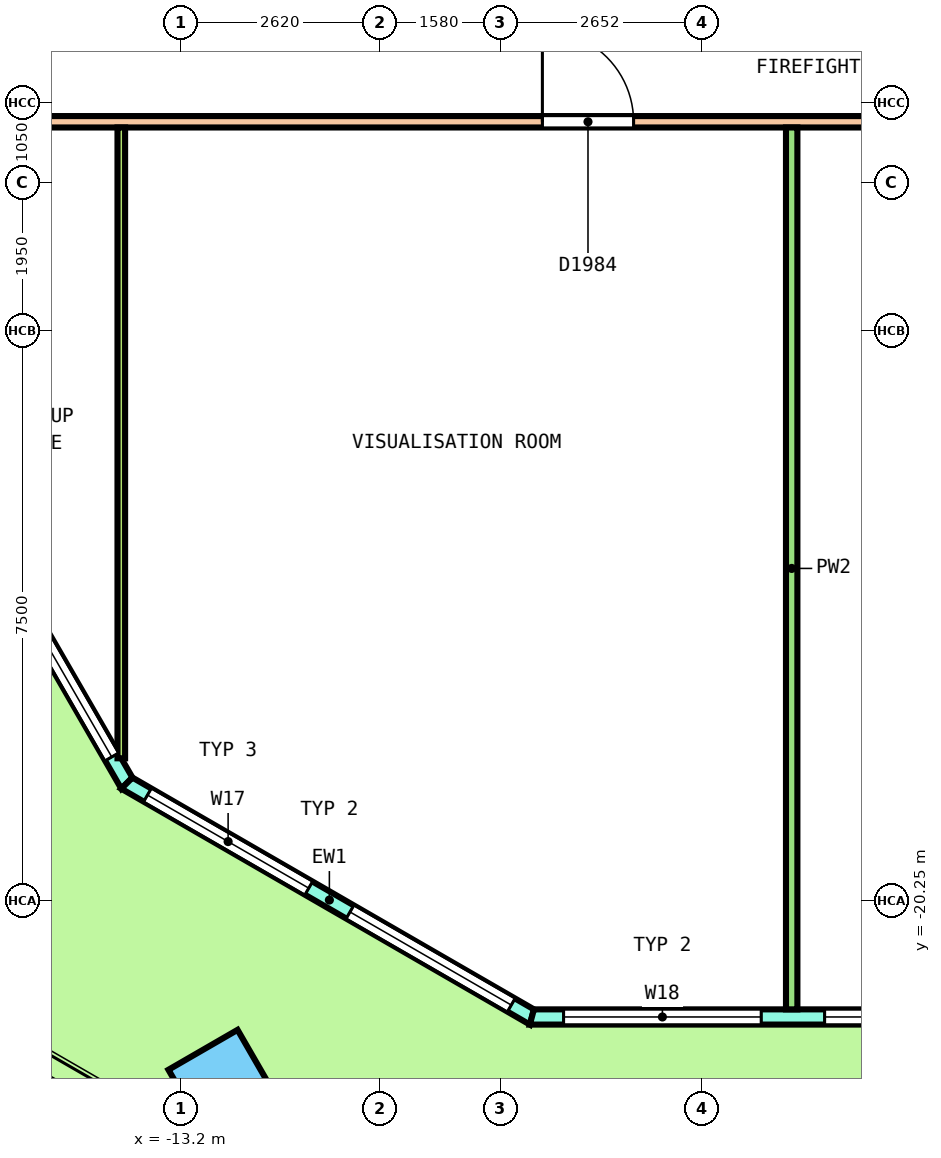
"""IFC4 building model, lengths in metres.
Left out: names, types, materials, properties, quantities, classifications, styles, units other than length and angle.
Written with IfcOpenShell. Run it as: python <this file> out.ifc"""

import sys

from ifc_helpers import new_model, si_unit, direction, frame, frame_2d, origin, origin_2d, place, context, subcontext, project, spatial, polyline, rectangle, outline, extrude, element, fill, save


model = new_model("IFC4")
c1 = context("Model", 3, precision=1e-05, world=origin(), true_north=direction((0.0, 1.0)))
c2 = subcontext(c1, "Body", "Model", "MODEL_VIEW")
j1 = project(units=[si_unit("LENGTHUNIT", "METRE"), si_unit("PLANEANGLEUNIT", "RADIAN")], contexts=[c1])
p1 = place(None, origin())
s1 = spatial("IfcSite", under=j1, at=p1, CompositionType="ELEMENT")
p2 = place(p1, origin())
s2 = spatial("IfcBuilding", under=s1, at=p2, CompositionType="ELEMENT")
p3 = place(p2, frame((0.0, 0.0, 223.4)))
s3 = spatial("IfcBuildingStorey", under=s2, at=p3, CompositionType="ELEMENT", Elevation=223.4)
p4 = place(p3, frame((-12.649, -22.664, 0.0), z_axis=(0.018113955825, -0.03141534774, 0.999342263957), x_axis=(0.86551973078, -0.499889444942, -0.031402841694)))
e1 = element("IfcColumn", 1, at=p4, inside=s3, PredefinedType="COLUMN", context=c2, shape_type="SweptSolid", body=[
    extrude(rectangle(XDim=1.05, YDim=1.05, at=origin_2d()), origin(), (0.0, 0.0, 1.0), 3.653),
])
p5 = place(p3, frame((-23.152, -2.699, 0.0), z_axis=(0.0, 0.0, 1.0), x_axis=(0.499993148765, -0.866029359311, 0.0)))
e2 = element("IfcWall", 2, at=p5, inside=s3, PredefinedType="SOLIDWALL", context=c2, shape_type="SweptSolid", body=[
    extrude(outline(polyline([(-0.027, -0.1), (1.003, -0.1), (2.032, -0.1), (3.062, -0.1), (4.091, -0.1), (5.121, -0.1), (6.15, -0.1), (7.179, -0.1), (8.209, -0.1), (9.238, -0.1), (10.268, -0.1), (11.297, -0.1), (12.327, -0.1), (13.356, -0.1), (14.386, -0.1), (15.415, -0.1), (16.445, -0.1), (17.474, -0.1), (18.504, -0.1), (18.45, 0.1), (17.427, 0.1), (16.403, 0.1), (15.379, 0.1), (14.356, 0.1), (13.333, 0.1), (12.309, 0.1), (11.285, 0.1), (10.262, 0.1), (9.238, 0.1), (8.215, 0.1), (7.191, 0.1), (6.168, 0.1), (5.144, 0.1), (4.121, 0.1), (3.097, 0.1), (2.074, 0.1), (1.05, 0.1), (0.027, 0.1), (-0.027, -0.1)])), origin(), (0.0, 0.0, 1.0), 3.7),
])
p6 = place(p5, frame((0.398, 0.0, 0.1)))
e3 = element("IfcOpeningElement", 3, at=p6, cuts=e2, PredefinedType="OPENING", context=c2, shape_type="SweptSolid", body=[
    extrude(rectangle(XDim=2.9, YDim=2.65, at=frame_2d((1.45, 1.325))), frame((0.0, 0.11, 0.0), z_axis=(0.0, -1.0, 0.0), x_axis=(1.0, 0.0, 0.0)), (0.0, 0.0, 1.0), 0.22),
])
p7 = place(p5, frame((4.093, 0.0, 0.1)))
e4 = element("IfcOpeningElement", 4, at=p7, cuts=e2, PredefinedType="OPENING", context=c2, shape_type="SweptSolid", body=[
    extrude(rectangle(XDim=2.9, YDim=2.65, at=frame_2d((1.45, 1.325))), frame((0.0, 0.11, 0.0), z_axis=(0.0, -1.0, 0.0), x_axis=(1.0, 0.0, 0.0)), (0.0, 0.0, 1.0), 0.22),
])
p8 = place(p5, frame((8.338, 0.0, 0.0)))
e5 = element("IfcOpeningElement", 5, at=p8, cuts=e2, PredefinedType="OPENING", context=c2, shape_type="SweptSolid", body=[
    extrude(rectangle(XDim=1.8, YDim=2.4, at=frame_2d((0.9, 1.2))), frame((0.0, 0.11, 0.0), z_axis=(0.0, -1.0, 0.0), x_axis=(1.0, 0.0, 0.0)), (0.0, 0.0, 1.0), 0.22),
])
p9 = place(p5, frame((8.338, 0.0, 2.55)))
e6 = element("IfcOpeningElement", 6, at=p9, cuts=e2, PredefinedType="OPENING", context=c2, shape_type="SweptSolid", body=[
    extrude(rectangle(XDim=1.8, YDim=0.2, at=frame_2d((0.9, 0.1))), frame((0.0, 0.11, 0.0), z_axis=(0.0, -1.0, 0.0), x_axis=(1.0, 0.0, 0.0)), (0.0, 0.0, 1.0), 0.22),
])
p10 = place(p5, frame((11.484, 0.0, 0.1)))
e7 = element("IfcOpeningElement", 7, at=p10, cuts=e2, PredefinedType="OPENING", context=c2, shape_type="SweptSolid", body=[
    extrude(rectangle(XDim=2.9, YDim=2.65, at=frame_2d((1.45, 1.325))), frame((0.0, 0.11, 0.0), z_axis=(0.0, -1.0, 0.0), x_axis=(1.0, 0.0, 0.0)), (0.0, 0.0, 1.0), 0.22),
])
p11 = place(p5, frame((15.179, 0.0, 0.1)))
e8 = element("IfcOpeningElement", 8, at=p11, cuts=e2, PredefinedType="OPENING", context=c2, shape_type="SweptSolid", body=[
    extrude(rectangle(XDim=2.9, YDim=2.65, at=frame_2d((1.45, 1.325))), frame((0.0, 0.11, 0.0), z_axis=(0.0, -1.0, 0.0), x_axis=(1.0, 0.0, 0.0)), (0.0, 0.0, 1.0), 0.22),
])
p12 = place(p3, frame((-13.914, -18.701, 0.0), z_axis=(0.0, 0.0, 1.0), x_axis=(0.866029647142, -0.499992650217, 0.0)))
e9 = element("IfcWall", 9, at=p12, inside=s3, PredefinedType="SOLIDWALL", context=c2, shape_type="SweptSolid", body=[
    extrude(outline(polyline([(-0.027, -0.1), (1.008, -0.1), (2.042, -0.1), (3.076, -0.1), (4.111, -0.1), (5.145, -0.1), (6.18, -0.1), (6.126, 0.1), (5.109, 0.1), (4.093, 0.1), (3.076, 0.1), (2.06, 0.1), (1.043, 0.1), (0.027, 0.1), (-0.027, -0.1)])), origin(), (0.0, 0.0, 1.0), 3.7),
])
p13 = place(p12, frame((0.313, 0.0, 0.1)))
e10 = element("IfcOpeningElement", 10, at=p13, cuts=e9, PredefinedType="OPENING", context=c2, shape_type="SweptSolid", body=[
    extrude(rectangle(XDim=2.45, YDim=2.65, at=frame_2d((1.225, 1.325))), frame((0.0, 0.11, 0.0), z_axis=(0.0, -1.0, 0.0), x_axis=(1.0, 0.0, 0.0)), (0.0, 0.0, 1.0), 0.22),
])
p14 = place(p12, frame((3.39, 0.0, 0.1)))
e11 = element("IfcOpeningElement", 11, at=p14, cuts=e9, PredefinedType="OPENING", context=c2, shape_type="SweptSolid", body=[
    extrude(rectangle(XDim=2.45, YDim=2.65, at=frame_2d((1.225, 1.325))), frame((0.0, 0.11, 0.0), z_axis=(0.0, -1.0, 0.0), x_axis=(1.0, 0.0, 0.0)), (0.0, 0.0, 1.0), 0.22),
])
p15 = place(p3, frame((-8.585, -21.777, 0.0), z_axis=(0.0, 0.0, 1.0), x_axis=(1.0, 0.0, 0.0)))
e12 = element("IfcWall", 12, at=p15, inside=s3, PredefinedType="SOLIDWALL", context=c2, shape_type="SweptSolid", body=[
    extrude(outline(polyline([(-0.027, -0.1), (0.986, -0.1), (2.0, -0.1), (3.013, -0.1), (4.026, -0.1), (5.039, -0.1), (6.052, -0.1), (7.065, -0.1), (8.079, -0.1), (9.092, -0.1), (10.105, -0.1), (11.118, -0.1), (12.131, -0.1), (13.145, -0.1), (14.158, -0.1), (15.171, -0.1), (16.184, -0.1), (17.197, -0.1), (17.144, 0.1), (16.137, 0.1), (15.13, 0.1), (14.123, 0.1), (13.116, 0.1), (12.109, 0.1), (11.102, 0.1), (10.095, 0.1), (9.089, 0.1), (8.082, 0.1), (7.075, 0.1), (6.068, 0.1), (5.061, 0.1), (4.054, 0.1), (3.047, 0.1), (2.041, 0.1), (1.034, 0.1), (0.027, 0.1), (-0.027, -0.1)])), origin(), (0.0, 0.0, 1.0), 3.7),
])
p16 = place(p15, frame((0.417, 0.0, 0.1)))
e13 = element("IfcOpeningElement", 13, at=p16, cuts=e12, PredefinedType="OPENING", context=c2, shape_type="SweptSolid", body=[
    extrude(rectangle(XDim=2.6, YDim=2.65, at=frame_2d((1.3, 1.325))), frame((0.0, 0.11, 0.0), z_axis=(0.0, -1.0, 0.0), x_axis=(1.0, 0.0, 0.0)), (0.0, 0.0, 1.0), 0.22),
])
p17 = place(p15, frame((3.851, 0.0, 0.1)))
e14 = element("IfcOpeningElement", 14, at=p17, cuts=e12, PredefinedType="OPENING", context=c2, shape_type="SweptSolid", body=[
    extrude(rectangle(XDim=2.6, YDim=2.65, at=frame_2d((1.3, 1.325))), frame((0.0, 0.11, 0.0), z_axis=(0.0, -1.0, 0.0), x_axis=(1.0, 0.0, 0.0)), (0.0, 0.0, 1.0), 0.22),
])
p18 = place(p15, frame((7.685, 0.0, 0.0)))
e15 = element("IfcOpeningElement", 15, at=p18, cuts=e12, PredefinedType="OPENING", context=c2, shape_type="SweptSolid", body=[
    extrude(rectangle(XDim=1.8, YDim=2.4, at=frame_2d((0.9, 1.2))), frame((0.0, 0.11, 0.0), z_axis=(0.0, -1.0, 0.0), x_axis=(1.0, 0.0, 0.0)), (0.0, 0.0, 1.0), 0.22),
])
p19 = place(p15, frame((7.685, 0.0, 2.55)))
e16 = element("IfcOpeningElement", 16, at=p19, cuts=e12, PredefinedType="OPENING", context=c2, shape_type="SweptSolid", body=[
    extrude(rectangle(XDim=1.8, YDim=0.2, at=frame_2d((0.9, 0.1))), frame((0.0, 0.11, 0.0), z_axis=(0.0, -1.0, 0.0), x_axis=(1.0, 0.0, 0.0)), (0.0, 0.0, 1.0), 0.22),
])
p20 = place(p15, frame((10.719, 0.0, 0.1)))
e17 = element("IfcOpeningElement", 17, at=p20, cuts=e12, PredefinedType="OPENING", context=c2, shape_type="SweptSolid", body=[
    extrude(rectangle(XDim=2.6, YDim=2.65, at=frame_2d((1.3, 1.325))), frame((0.0, 0.11, 0.0), z_axis=(0.0, -1.0, 0.0), x_axis=(1.0, 0.0, 0.0)), (0.0, 0.0, 1.0), 0.22),
])
p21 = place(p15, frame((14.153, 0.0, 0.1)))
e18 = element("IfcOpeningElement", 18, at=p21, cuts=e12, PredefinedType="OPENING", context=c2, shape_type="SweptSolid", body=[
    extrude(rectangle(XDim=2.6, YDim=2.65, at=frame_2d((1.3, 1.325))), frame((0.0, 0.11, 0.0), z_axis=(0.0, -1.0, 0.0), x_axis=(1.0, 0.0, 0.0)), (0.0, 0.0, 1.0), 0.22),
])
p22 = place(p3, frame((-15.175, -10.0, 0.0), z_axis=(0.0, 0.0, 1.0), x_axis=(1.0, 0.0, 0.0)))
e19 = element("IfcWall", 19, at=p22, inside=s3, PredefinedType="PARTITIONING", context=c2, shape_type="SweptSolid", body=[
    extrude(rectangle(XDim=30.225, YDim=0.15, at=frame_2d((15.113, 0.0))), origin(), (0.0, 0.0, 1.0), 2.8),
])
p23 = place(p22, frame((6.728, 0.0, 0.0)))
e20 = element("IfcOpeningElement", 20, at=p23, cuts=e19, PredefinedType="OPENING", context=c2, shape_type="SweptSolid", body=[
    extrude(rectangle(XDim=1.2, YDim=2.1, at=frame_2d((0.6, 1.05))), frame((0.0, 0.085, 0.0), z_axis=(0.0, -1.0, 0.0), x_axis=(1.0, 0.0, 0.0)), (0.0, 0.0, 1.0), 0.17),
])
p24 = place(p22, frame((14.1, 0.0, 0.0)))
e21 = element("IfcOpeningElement", 21, at=p24, cuts=e19, PredefinedType="OPENING", context=c2, shape_type="SweptSolid", body=[
    extrude(rectangle(XDim=1.2, YDim=2.1, at=frame_2d((0.6, 1.05))), frame((0.0, 0.085, 0.0), z_axis=(0.0, -1.0, 0.0), x_axis=(1.0, 0.0, 0.0)), (0.0, 0.0, 1.0), 0.17),
])
p25 = place(p22, frame((19.842, 0.0, 0.0)))
e22 = element("IfcOpeningElement", 22, at=p25, cuts=e19, PredefinedType="OPENING", context=c2, shape_type="SweptSolid", body=[
    extrude(rectangle(XDim=1.0, YDim=2.1, at=frame_2d((0.5, 1.05))), frame((0.0, 0.085, 0.0), z_axis=(0.0, -1.0, 0.0), x_axis=(1.0, 0.0, 0.0)), (0.0, 0.0, 1.0), 0.17),
])
p26 = place(p22, frame((26.396, 0.0, 0.0)))
e23 = element("IfcOpeningElement", 23, at=p26, cuts=e19, PredefinedType="OPENING", context=c2, shape_type="SweptSolid", body=[
    extrude(rectangle(XDim=1.2, YDim=2.1, at=frame_2d((0.6, 1.05))), frame((0.0, 0.085, 0.0), z_axis=(0.0, -1.0, 0.0), x_axis=(1.0, 0.0, 0.0)), (0.0, 0.0, 1.0), 0.17),
])
p27 = place(p3, frame((-5.167, -21.677, 0.0), z_axis=(0.0, 0.0, 1.0), x_axis=(0.0, 1.0, 0.0)))
e24 = element("IfcWall", 24, at=p27, inside=s3, PredefinedType="PARTITIONING", context=c2, shape_type="SweptSolid", body=[
    extrude(rectangle(XDim=11.602, YDim=0.15, at=frame_2d((5.801, 0.0))), origin(), (0.0, 0.0, 1.0), 2.8),
])
p28 = place(p3, frame((-13.987, -18.374, 0.0), z_axis=(0.0, 0.0, 1.0), x_axis=(0.0, 1.0, 0.0)))
e25 = element("IfcWall", 25, at=p28, inside=s3, PredefinedType="PARTITIONING", context=c2, shape_type="SweptSolid", body=[
    extrude(rectangle(XDim=8.299, YDim=0.1, at=frame_2d((4.149, 0.0))), origin(), (0.0, 0.0, 1.0), 2.8),
])
p29 = place(p11, origin())
e26 = element("IfcWindow", 26, at=p29, inside=s3, PartitioningType="SINGLE_PANEL", PredefinedType="WINDOW", context=c2, shape_type="SweptSolid", body=[
    extrude(rectangle(XDim=2.9, YDim=2.65, at=frame_2d((1.45, 1.325))), frame((0.0, 0.03, 0.0), z_axis=(0.0, -1.0, 0.0), x_axis=(1.0, 0.0, 0.0)), (0.0, 0.0, 1.0), 0.06),
])
fill(e8, e26)
p30 = place(p13, origin())
e27 = element("IfcWindow", 27, at=p30, inside=s3, PartitioningType="SINGLE_PANEL", PredefinedType="WINDOW", context=c2, shape_type="SweptSolid", body=[
    extrude(rectangle(XDim=2.45, YDim=2.65, at=frame_2d((1.225, 1.325))), frame((0.0, 0.03, 0.0), z_axis=(0.0, -1.0, 0.0), x_axis=(1.0, 0.0, 0.0)), (0.0, 0.0, 1.0), 0.06),
])
fill(e10, e27)
p31 = place(p14, origin())
e28 = element("IfcWindow", 28, at=p31, inside=s3, PartitioningType="SINGLE_PANEL", PredefinedType="WINDOW", context=c2, shape_type="SweptSolid", body=[
    extrude(rectangle(XDim=2.45, YDim=2.65, at=frame_2d((1.225, 1.325))), frame((0.0, 0.03, 0.0), z_axis=(0.0, -1.0, 0.0), x_axis=(1.0, 0.0, 0.0)), (0.0, 0.0, 1.0), 0.06),
])
fill(e11, e28)
p32 = place(p16, origin())
e29 = element("IfcWindow", 29, at=p32, inside=s3, PartitioningType="SINGLE_PANEL", PredefinedType="WINDOW", context=c2, shape_type="SweptSolid", body=[
    extrude(rectangle(XDim=2.6, YDim=2.65, at=frame_2d((1.3, 1.325))), frame((0.0, 0.03, 0.0), z_axis=(0.0, -1.0, 0.0), x_axis=(1.0, 0.0, 0.0)), (0.0, 0.0, 1.0), 0.06),
])
fill(e13, e29)
p33 = place(p17, origin())
e30 = element("IfcWindow", 30, at=p33, inside=s3, PartitioningType="SINGLE_PANEL", PredefinedType="WINDOW", context=c2, shape_type="SweptSolid", body=[
    extrude(rectangle(XDim=2.6, YDim=2.65, at=frame_2d((1.3, 1.325))), frame((0.0, 0.03, 0.0), z_axis=(0.0, -1.0, 0.0), x_axis=(1.0, 0.0, 0.0)), (0.0, 0.0, 1.0), 0.06),
])
fill(e14, e30)
p34 = place(p23, origin())
e31 = element("IfcDoor", 31, at=p34, inside=s3, OperationType="DOUBLE_DOOR_SINGLE_SWING", PredefinedType="DOOR", context=c2, shape_type="SweptSolid", body=[
    extrude(rectangle(XDim=1.2, YDim=2.1, at=frame_2d((0.6, 1.05))), frame((0.0, 0.025, 0.0), z_axis=(0.0, -1.0, 0.0), x_axis=(1.0, 0.0, 0.0)), (0.0, 0.0, 1.0), 0.05),
])
fill(e20, e31)
save(model, sys.argv[1])
